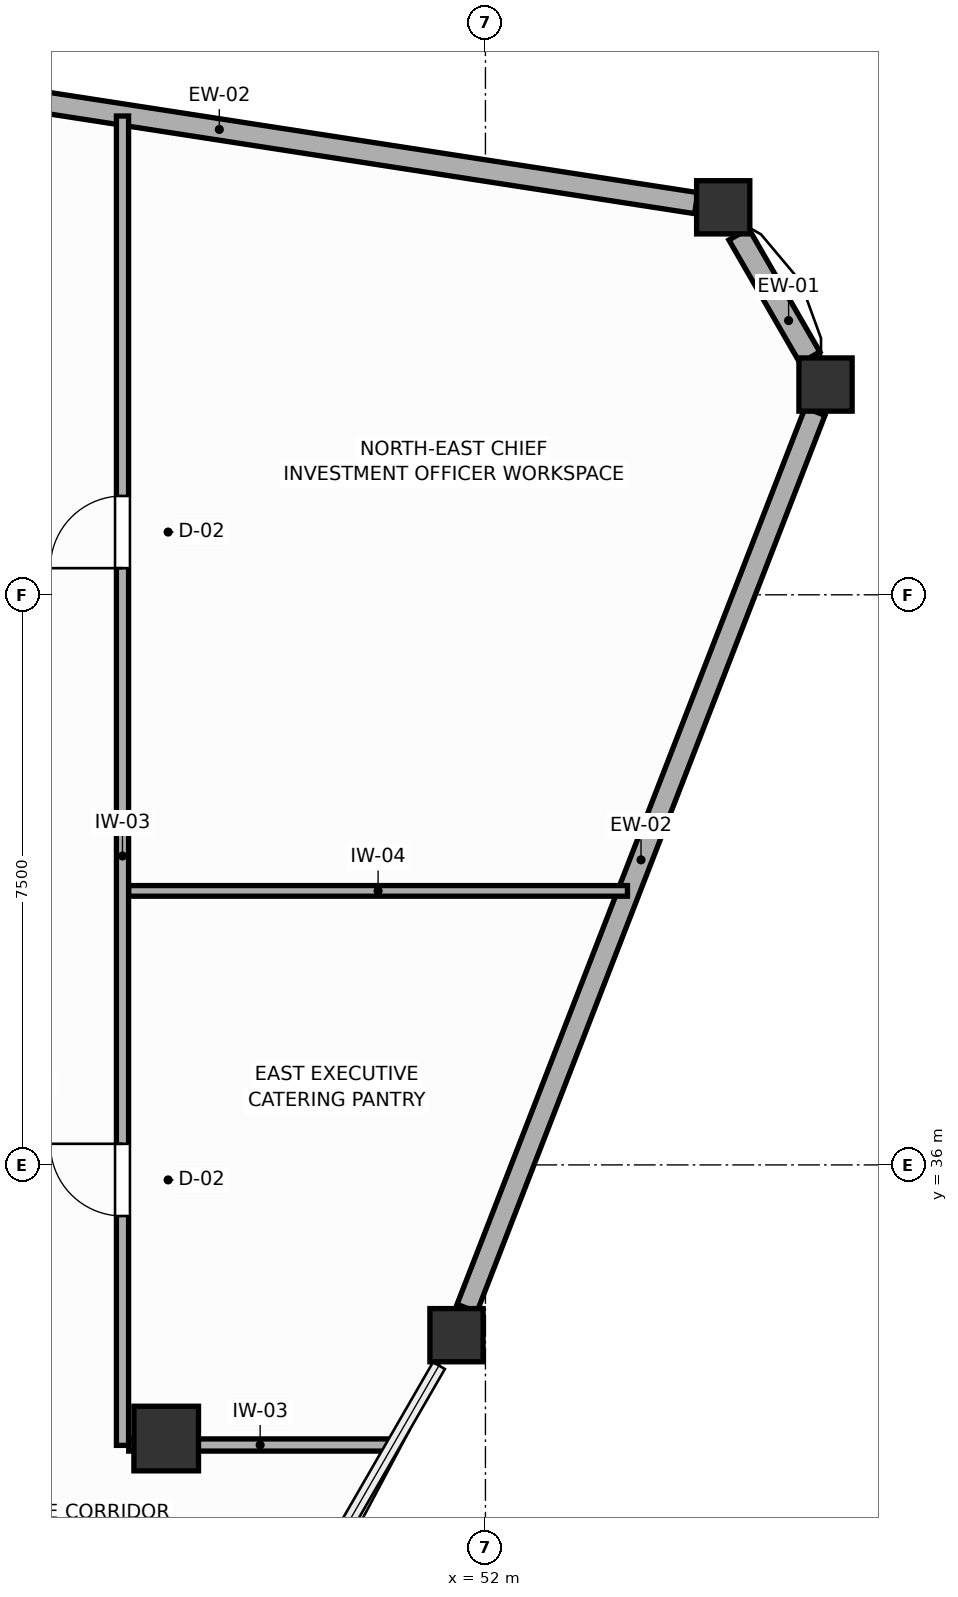
"""IFC4 building model, lengths in metres.
Left out: names, types, materials, properties, quantities, classifications, styles, units other than length and angle.
Written with IfcOpenShell. Run it as: python <this file> out.ifc"""

import sys

from ifc_helpers import new_model, si_unit, direction, frame, frame_2d, origin, origin_2d, place, context, subcontext, project, spatial, rectangle, extrude, source, transform, mapped, element, fill, save


model = new_model("IFC4")
c1 = context("Model", 3, precision=1e-05, world=origin(), true_north=direction((0.0, 1.0)))
c2 = subcontext(c1, "Body", "Model", "MODEL_VIEW")
j1 = project(units=[si_unit("LENGTHUNIT", "METRE"), si_unit("PLANEANGLEUNIT", "RADIAN")], contexts=[c1])
p1 = place(None, origin())
s1 = spatial("IfcSite", under=j1, at=p1, CompositionType="ELEMENT")
p2 = place(p1, origin())
s2 = spatial("IfcBuilding", under=s1, at=p2, CompositionType="ELEMENT")
p3 = place(p2, frame((0.0, 0.0, 264.6)))
s3 = spatial("IfcBuildingStorey", under=s2, at=p3, CompositionType="ELEMENT", Elevation=264.6)
m1 = source(origin(), c2, "Body", "SweptSolid", [
    extrude(rectangle(XDim=0.85, YDim=0.85, at=origin_2d()), origin(), (0.0, 0.0, 1.0), 3.6),
])
p4 = place(p3, frame((47.8, 32.4, 0.0), z_axis=(0.0, 0.0, 1.0), x_axis=(1.0, 0.0, 0.0)))
e1 = element("IfcColumn", 1, at=p4, inside=s3, PredefinedType="COLUMN", context=c2, shape_type="MappedRepresentation", body=[
    mapped(m1, transform((0.0, 0.0, 0.0), scale=1.0)),
])
m2 = source(origin(), c2, "Body", "SweptSolid", [
    extrude(rectangle(XDim=0.7, YDim=0.7, at=origin_2d()), origin(), (0.0, 0.0, 1.0), 3.6),
])
for number, where, z_axis, x_axis in (
    (2, (56.474, 46.266, 0.0), (0.0, 0.0, 1.0), (1.0, 0.0, 0.0)),
    (3, (55.128, 48.598, 0.0), (0.0, 0.0, 1.0), (1.0, 0.0, 0.0)),
    (4, (51.619, 33.76, 0.0), (0.0, 0.0, 1.0), (1.0, 0.0, 0.0)),
):
    element("IfcColumn", number, at=place(p3, frame(where, z_axis=z_axis, x_axis=x_axis)), inside=s3, PredefinedType="COLUMN", context=c2, shape_type="MappedRepresentation", body=[
        mapped(m2, transform((0.0, 0.0, 0.0), scale=1.0)),
    ])
p5 = place(p3, frame((56.269, 46.621, 0.0), z_axis=(0.0, 0.0, 1.0), x_axis=(-0.500023421257, 0.866011881093, 0.0)))
e5 = element("IfcWall", 5, at=p5, inside=s3, PredefinedType="SOLIDWALL", context=c2, shape_type="SweptSolid", body=[
    extrude(rectangle(XDim=1.873, YDim=0.3, at=frame_2d((0.936, 0.0))), origin(), (0.0, 0.0, 1.0), 3.08),
])
p6 = place(p3, frame((54.773, 48.653, 0.0), z_axis=(0.0, 0.0, 1.0), x_axis=(-0.988271454673, 0.152707340617, 0.0)))
e6 = element("IfcWall", 6, at=p6, inside=s3, PredefinedType="SOLIDWALL", context=c2, shape_type="SweptSolid", body=[
    extrude(rectangle(XDim=12.697, YDim=0.28, at=frame_2d((6.349, 0.0))), origin(), (0.0, 0.0, 1.0), 3.08),
])
p7 = place(p3, frame((51.757, 34.115, 0.0), z_axis=(0.0, 0.0, 1.0), x_axis=(0.3618810561, 0.932224276253, 0.0)))
e7 = element("IfcWall", 7, at=p7, inside=s3, PredefinedType="SOLIDWALL", context=c2, shape_type="SweptSolid", body=[
    extrude(rectangle(XDim=12.654, YDim=0.28, at=frame_2d((6.327, 0.0))), origin(), (0.0, 0.0, 1.0), 3.08),
])
p8 = place(p3, frame((47.225, 32.31, 0.0), z_axis=(0.0, 0.0, 1.0), x_axis=(0.0, 1.0, 0.0)))
e8 = element("IfcWall", 8, at=p8, inside=s3, PredefinedType="PARTITIONING", context=c2, shape_type="SweptSolid", body=[
    extrude(rectangle(XDim=17.489, YDim=0.16, at=frame_2d((8.745, 0.0))), origin(), (0.0, 0.0, 1.0), 3.41),
])
p9 = place(p8, frame((3.018, 0.0, 0.0)))
e9 = element("IfcOpeningElement", 9, at=p9, cuts=e8, PredefinedType="OPENING", context=c2, shape_type="SweptSolid", body=[
    extrude(rectangle(XDim=0.95, YDim=2.05, at=frame_2d((0.475, 1.025))), frame((0.0, 0.09, 0.0), z_axis=(0.0, -1.0, 0.0), x_axis=(1.0, 0.0, 0.0)), (0.0, 0.0, 1.0), 0.18),
])
p10 = place(p8, frame((11.541, 0.0, 0.0)))
e10 = element("IfcOpeningElement", 10, at=p10, cuts=e8, PredefinedType="OPENING", context=c2, shape_type="SweptSolid", body=[
    extrude(rectangle(XDim=0.95, YDim=2.05, at=frame_2d((0.475, 1.025))), frame((0.0, 0.09, 0.0), z_axis=(0.0, -1.0, 0.0), x_axis=(1.0, 0.0, 0.0)), (0.0, 0.0, 1.0), 0.18),
])
p11 = place(p3, frame((47.307, 32.315, 0.0), z_axis=(0.0, 0.0, 1.0), x_axis=(1.0, 0.0, 0.0)))
e11 = element("IfcWall", 11, at=p11, inside=s3, PredefinedType="PARTITIONING", context=c2, shape_type="SweptSolid", body=[
    extrude(rectangle(XDim=3.458, YDim=0.16, at=frame_2d((1.729, 0.0))), origin(), (0.0, 0.0, 1.0), 3.08),
])
p12 = place(p3, frame((47.307, 39.605, 0.0), z_axis=(0.0, 0.0, 1.0), x_axis=(1.0, 0.0, 0.0)))
e12 = element("IfcWall", 12, at=p12, inside=s3, PredefinedType="PARTITIONING", context=c2, shape_type="SweptSolid", body=[
    extrude(rectangle(XDim=6.562, YDim=0.14, at=frame_2d((3.281, 0.0))), origin(), (0.0, 0.0, 1.0), 3.41),
])
p13 = place(p9, origin())
e13 = element("IfcDoor", 13, at=p13, inside=s3, OperationType="SINGLE_SWING_RIGHT", PredefinedType="DOOR", context=c2, shape_type="SweptSolid", body=[
    extrude(rectangle(XDim=0.95, YDim=2.05, at=frame_2d((0.475, 1.025))), frame((0.0, 0.025, 0.0), z_axis=(0.0, -1.0, 0.0), x_axis=(1.0, 0.0, 0.0)), (0.0, 0.0, 1.0), 0.05),
])
fill(e9, e13)
p14 = place(p10, origin())
e14 = element("IfcDoor", 14, at=p14, inside=s3, OperationType="SINGLE_SWING_LEFT", PredefinedType="DOOR", context=c2, shape_type="SweptSolid", body=[
    extrude(rectangle(XDim=0.95, YDim=2.05, at=frame_2d((0.475, 1.025))), frame((0.0, 0.025, 0.0), z_axis=(0.0, -1.0, 0.0), x_axis=(1.0, 0.0, 0.0)), (0.0, 0.0, 1.0), 0.05),
])
fill(e10, e14)
save(model, sys.argv[1])
